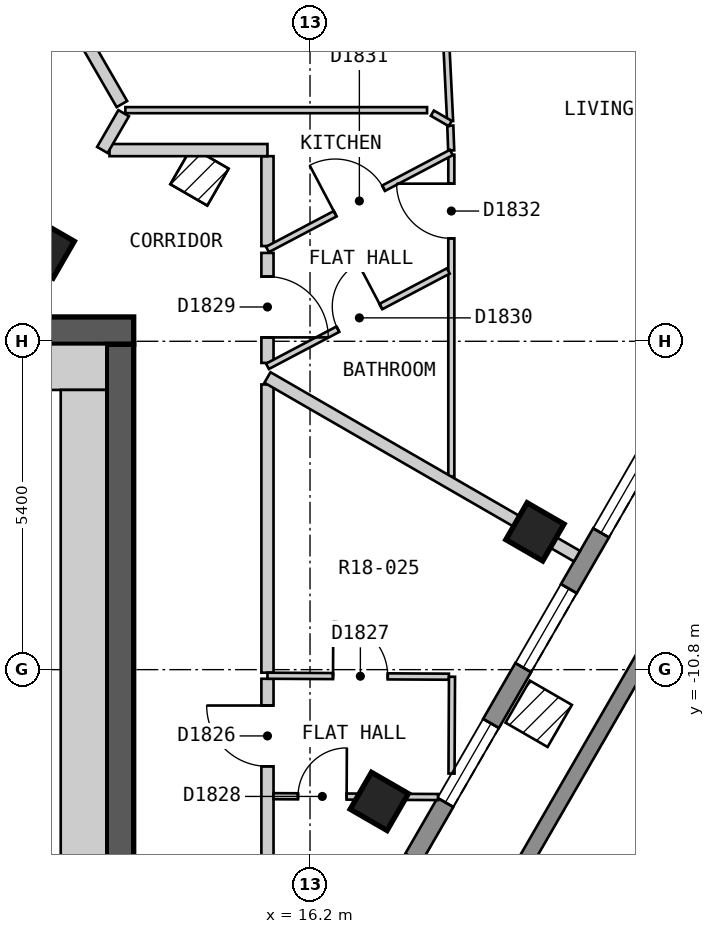
"""IFC4 building model, lengths in metres.
Left out: names, types, materials, properties, quantities, classifications, styles, units other than length and angle.
Written with IfcOpenShell. Run it as: python <this file> out.ifc"""

import sys

from ifc_helpers import new_model, si_unit, direction, frame, frame_2d, origin, origin_2d, place, context, subcontext, project, spatial, polyline, rectangle, outline, extrude, element, fill, save


model = new_model("IFC4")
c1 = context("Model", 3, precision=1e-05, world=origin(), true_north=direction((0.0, 1.0)))
c2 = subcontext(c1, "Body", "Model", "MODEL_VIEW")
j1 = project(units=[si_unit("LENGTHUNIT", "METRE"), si_unit("PLANEANGLEUNIT", "RADIAN")], contexts=[c1])
p1 = place(None, origin())
s1 = spatial("IfcSite", under=j1, at=p1, CompositionType="ELEMENT")
p2 = place(p1, origin())
s2 = spatial("IfcBuilding", under=s1, at=p2, CompositionType="ELEMENT")
p3 = place(p2, frame((0.0, 0.0, 202.8)))
s3 = spatial("IfcBuildingStorey", under=s2, at=p3, CompositionType="ELEMENT", Elevation=202.8)
for number, where, z_axis, x_axis in (
    (1, (17.339, -12.967, 0.0), (0.0, 0.0, 1.0), (0.5, 0.866, 0.0)),
    (2, (19.899, -8.534, 0.0), (0.0, 0.0, 1.0), (0.5, 0.866, 0.0)),
    (3, (11.845, -3.884, 0.0), (0.0, 0.0, 1.0), (0.5, 0.866, 0.0)),
):
    element("IfcColumn", number, at=place(p3, frame(where, z_axis=z_axis, x_axis=x_axis)), inside=s3, PredefinedType="COLUMN", context=c2, shape_type="SweptSolid", body=[
        extrude(rectangle(XDim=0.7, YDim=0.7, at=origin_2d()), origin(), (0.0, 0.0, 1.0), 3.0),
    ])
p4 = place(p3, frame((-13.3, -5.225, 0.0), z_axis=(0.0, 0.0, 1.0), x_axis=(1.0, 0.0, 0.0)))
e4 = element("IfcWall", 4, at=p4, inside=s3, PredefinedType="SHEAR", context=c2, shape_type="SweptSolid", body=[
    extrude(rectangle(XDim=26.6, YDim=0.45, at=frame_2d((13.3, 0.0))), origin(), (0.0, 0.0, 1.0), 2.7),
])
p5 = place(p4, frame((23.65, 0.0, 0.0)))
e5 = element("IfcOpeningElement", 5, at=p5, cuts=e4, PredefinedType="OPENING", context=c2, shape_type="SweptSolid", body=[
    extrude(rectangle(XDim=1.2, YDim=2.1, at=frame_2d((0.6, 1.05))), frame((0.0, 0.235, 0.0), z_axis=(0.0, -1.0, 0.0), x_axis=(1.0, 0.0, 0.0)), (0.0, 0.0, 1.0), 0.47),
])
p6 = place(p3, frame((13.075, -18.55, 0.0), z_axis=(0.0, 0.0, 1.0), x_axis=(0.0, 1.0, 0.0)))
e6 = element("IfcWall", 6, at=p6, inside=s3, PredefinedType="SHEAR", context=c2, shape_type="SweptSolid", body=[
    extrude(rectangle(XDim=13.1, YDim=0.45, at=frame_2d((6.55, 0.0))), origin(), (0.0, 0.0, 1.0), 2.7),
])
p7 = place(p3, frame((15.285, -18.425, 0.0), z_axis=(0.0, 0.0, 1.0), x_axis=(0.500012653391, 0.866018098222, 0.0)))
e7 = element("IfcWall", 7, at=p7, inside=s3, PredefinedType="SOLIDWALL", context=c2, shape_type="SweptSolid", body=[
    extrude(outline(polyline([(0.0, -0.15), (16.628, -0.15), (16.548, 0.15), (0.08, 0.15), (0.0, -0.15)])), origin(), (0.0, 0.0, 1.0), 2.7),
])
p8 = place(p7, frame((1.165, 0.0, 0.15)))
e8 = element("IfcOpeningElement", 8, at=p8, cuts=e7, PredefinedType="OPENING", context=c2, shape_type="SweptSolid", body=[
    extrude(rectangle(XDim=1.5, YDim=2.1, at=frame_2d((0.75, 1.05))), frame((0.0, 0.16, 0.0), z_axis=(0.0, -1.0, 0.0), x_axis=(1.0, 0.0, 0.0)), (0.0, 0.0, 1.0), 0.32),
])
p9 = place(p7, frame((3.724, 0.0, 0.15)))
e9 = element("IfcOpeningElement", 9, at=p9, cuts=e7, PredefinedType="OPENING", context=c2, shape_type="SweptSolid", body=[
    extrude(rectangle(XDim=1.5, YDim=2.1, at=frame_2d((0.75, 1.05))), frame((0.0, 0.16, 0.0), z_axis=(0.0, -1.0, 0.0), x_axis=(1.0, 0.0, 0.0)), (0.0, 0.0, 1.0), 0.32),
])
p10 = place(p7, frame((6.283, 0.0, 0.15)))
e10 = element("IfcOpeningElement", 10, at=p10, cuts=e7, PredefinedType="OPENING", context=c2, shape_type="SweptSolid", body=[
    extrude(rectangle(XDim=1.5, YDim=2.1, at=frame_2d((0.75, 1.05))), frame((0.0, 0.16, 0.0), z_axis=(0.0, -1.0, 0.0), x_axis=(1.0, 0.0, 0.0)), (0.0, 0.0, 1.0), 0.32),
])
p11 = place(p7, frame((8.843, 0.0, 0.15)))
e11 = element("IfcOpeningElement", 11, at=p11, cuts=e7, PredefinedType="OPENING", context=c2, shape_type="SweptSolid", body=[
    extrude(rectangle(XDim=1.5, YDim=2.1, at=frame_2d((0.75, 1.05))), frame((0.0, 0.16, 0.0), z_axis=(0.0, -1.0, 0.0), x_axis=(1.0, 0.0, 0.0)), (0.0, 0.0, 1.0), 0.32),
])
p12 = place(p7, frame((11.402, 0.0, 0.15)))
e12 = element("IfcOpeningElement", 12, at=p12, cuts=e7, PredefinedType="OPENING", context=c2, shape_type="SweptSolid", body=[
    extrude(rectangle(XDim=1.5, YDim=2.1, at=frame_2d((0.75, 1.05))), frame((0.0, 0.16, 0.0), z_axis=(0.0, -1.0, 0.0), x_axis=(1.0, 0.0, 0.0)), (0.0, 0.0, 1.0), 0.32),
])
p13 = place(p7, frame((13.962, 0.0, 0.15)))
e13 = element("IfcOpeningElement", 13, at=p13, cuts=e7, PredefinedType="OPENING", context=c2, shape_type="SweptSolid", body=[
    extrude(rectangle(XDim=1.5, YDim=2.1, at=frame_2d((0.75, 1.05))), frame((0.0, 0.16, 0.0), z_axis=(0.0, -1.0, 0.0), x_axis=(1.0, 0.0, 0.0)), (0.0, 0.0, 1.0), 0.32),
])
p14 = place(p3, frame((26.046, -3.038, 0.0), z_axis=(0.0, 0.0, 1.0), x_axis=(-0.500074253024, -0.865982529536, 0.0)))
e14 = element("IfcWall", 14, at=p14, inside=s3, PredefinedType="PARAPET", context=c2, shape_type="SweptSolid", body=[
    extrude(outline(polyline([(0.067, -0.125), (20.718, -0.125), (20.784, 0.125), (0.0, 0.125), (0.067, -0.125)])), origin(), (0.0, 0.0, 1.0), 1.6),
])
p15 = place(p3, frame((9.238, 5.2, 0.0), z_axis=(0.0, 0.0, 1.0), x_axis=(0.500025705601, -0.86601056214, 0.0)))
e15 = element("IfcWall", 15, at=p15, inside=s3, PredefinedType="PARTITIONING", context=c2, shape_type="SweptSolid", body=[
    extrude(rectangle(XDim=7.735, YDim=0.2, at=frame_2d((3.868, 0.0))), origin(), (0.0, 0.0, 1.0), 2.7),
])
p16 = place(p3, frame((15.5, -2.356, 0.0), z_axis=(0.0, 0.0, 1.0), x_axis=(0.0, -1.0, 0.0)))
e16 = element("IfcWall", 16, at=p16, inside=s3, PredefinedType="PARTITIONING", context=c2, shape_type="SweptSolid", body=[
    extrude(rectangle(XDim=1.478, YDim=0.2, at=frame_2d((0.739, 0.0))), origin(), (0.0, 0.0, 1.0), 2.7),
])
p17 = place(p3, frame((15.5, -6.11, 0.0), z_axis=(0.0, 0.0, 1.0), x_axis=(0.0, -1.0, 0.0)))
e17 = element("IfcWall", 17, at=p17, inside=s3, PredefinedType="PARTITIONING", context=c2, shape_type="SweptSolid", body=[
    extrude(rectangle(XDim=4.74, YDim=0.2, at=frame_2d((2.37, 0.0))), origin(), (0.0, 0.0, 1.0), 2.7),
])
p18 = place(p3, frame((12.902, -2.256, 0.0), z_axis=(0.0, 0.0, 1.0), x_axis=(1.0, 0.0, 0.0)))
e18 = element("IfcWall", 18, at=p18, inside=s3, PredefinedType="PARTITIONING", context=c2, shape_type="SweptSolid", body=[
    extrude(rectangle(XDim=2.598, YDim=0.2, at=frame_2d((1.299, 0.0))), origin(), (0.0, 0.0, 1.0), 2.7),
])
p19 = place(p3, frame((12.785, -2.254, 0.0), z_axis=(0.0, 0.0, 1.0), x_axis=(0.500871040665, 0.865521923826, 0.0)))
e19 = element("IfcWall", 19, at=p19, inside=s3, PredefinedType="PARTITIONING", context=c2, shape_type="SweptSolid", body=[
    extrude(rectangle(XDim=0.699, YDim=0.2, at=frame_2d((0.35, 0.0))), origin(), (0.0, 0.0, 1.0), 2.7),
])
p20 = place(p3, frame((15.5, -15.09, 0.0), z_axis=(0.0, 0.0, 1.0), x_axis=(0.0, 1.0, 0.0)))
e20 = element("IfcWall", 20, at=p20, inside=s3, PredefinedType="PARTITIONING", context=c2, shape_type="SweptSolid", body=[
    extrude(rectangle(XDim=4.14, YDim=0.2, at=frame_2d((2.07, 0.0))), origin(), (0.0, 0.0, 1.0), 2.7),
])
p21 = place(p20, frame((2.7, 0.0, 0.0)))
e21 = element("IfcOpeningElement", 21, at=p21, cuts=e20, PredefinedType="OPENING", context=c2, shape_type="SweptSolid", body=[
    extrude(rectangle(XDim=1.0, YDim=2.1, at=frame_2d((0.5, 1.05))), frame((0.0, 0.11, 0.0), z_axis=(0.0, -1.0, 0.0), x_axis=(1.0, 0.0, 0.0)), (0.0, 0.0, 1.0), 0.22),
])
p22 = place(p3, frame((15.5, -5.756, 0.0), z_axis=(0.0, 0.0, 1.0), x_axis=(0.0, 1.0, 0.0)))
e22 = element("IfcWall", 22, at=p22, inside=s3, PredefinedType="PARTITIONING", context=c2, shape_type="SweptSolid", body=[
    extrude(rectangle(XDim=1.809, YDim=0.2, at=frame_2d((0.905, 0.0))), origin(), (0.0, 0.0, 1.0), 2.7),
])
p23 = place(p22, frame((0.42, 0.0, 0.0)))
e23 = element("IfcOpeningElement", 23, at=p23, cuts=e22, PredefinedType="OPENING", context=c2, shape_type="SweptSolid", body=[
    extrude(rectangle(XDim=1.0, YDim=2.1, at=frame_2d((0.5, 1.05))), frame((0.0, 0.11, 0.0), z_axis=(0.0, -1.0, 0.0), x_axis=(1.0, 0.0, 0.0)), (0.0, 0.0, 1.0), 0.22),
])
p24 = place(p3, frame((15.5, -10.9, 0.0), z_axis=(0.0, 0.0, 1.0), x_axis=(0.999985419789, -0.005400019449, 0.0)))
e24 = element("IfcWall", 24, at=p24, inside=s3, PredefinedType="PARTITIONING", context=c2, shape_type="SweptSolid", body=[
    extrude(rectangle(XDim=2.984, YDim=0.1, at=frame_2d((1.492, 0.0))), origin(), (0.0, 0.0, 1.0), 2.7),
])
p25 = place(p24, frame((1.078, 0.0, 0.0)))
e25 = element("IfcOpeningElement", 25, at=p25, cuts=e24, PredefinedType="OPENING", context=c2, shape_type="SweptSolid", body=[
    extrude(rectangle(XDim=0.9, YDim=2.1, at=frame_2d((0.45, 1.05))), frame((0.0, 0.06, 0.0), z_axis=(0.0, -1.0, 0.0), x_axis=(1.0, 0.0, 0.0)), (0.0, 0.0, 1.0), 0.12),
])
p26 = place(p3, frame((15.6, -12.881, 0.0), z_axis=(0.0, 0.0, 1.0), x_axis=(0.999986765426, -0.00514480058, 0.0)))
e26 = element("IfcWall", 26, at=p26, inside=s3, PredefinedType="PARTITIONING", context=c2, shape_type="SweptSolid", body=[
    extrude(rectangle(XDim=2.705, YDim=0.1, at=frame_2d((1.353, 0.0))), origin(), (0.0, 0.0, 1.0), 2.7),
])
p27 = place(p26, frame((0.402, 0.0, 0.0)))
e27 = element("IfcOpeningElement", 27, at=p27, cuts=e26, PredefinedType="OPENING", context=c2, shape_type="SweptSolid", body=[
    extrude(rectangle(XDim=0.8, YDim=2.1, at=frame_2d((0.4, 1.05))), frame((0.0, 0.06, 0.0), z_axis=(0.0, -1.0, 0.0), x_axis=(1.0, 0.0, 0.0)), (0.0, 0.0, 1.0), 0.12),
])
p28 = place(p3, frame((18.388, 0.579, 0.0), z_axis=(0.0, 0.0, 1.0), x_axis=(0.049097293833, -0.998794000652, 0.0)))
e28 = element("IfcWall", 28, at=p28, inside=s3, PredefinedType="PARTITIONING", context=c2, shape_type="SweptSolid", body=[
    extrude(rectangle(XDim=2.362, YDim=0.1, at=frame_2d((1.181, 0.0))), origin(), (0.0, 0.0, 1.0), 2.7),
])
p29 = place(p3, frame((18.507, -1.854, 0.0), z_axis=(0.0, 0.0, 1.0), x_axis=(0.036480787329, -0.999334354536, 0.0)))
e29 = element("IfcWall", 29, at=p29, inside=s3, PredefinedType="PARTITIONING", context=c2, shape_type="SweptSolid", body=[
    extrude(rectangle(XDim=0.408, YDim=0.1, at=frame_2d((0.204, 0.0))), origin(), (0.0, 0.0, 1.0), 2.7),
])
p30 = place(p3, frame((18.212, -1.649, 0.0), z_axis=(0.0, 0.0, 1.0), x_axis=(0.865622947871, -0.500696427109, 0.0)))
e30 = element("IfcWall", 30, at=p30, inside=s3, PredefinedType="PARTITIONING", context=c2, shape_type="SweptSolid", body=[
    extrude(rectangle(XDim=0.34, YDim=0.1, at=frame_2d((0.17, 0.0))), origin(), (0.0, 0.0, 1.0), 2.7),
])
p31 = place(p3, frame((13.163, -1.599, 0.0), z_axis=(0.0, 0.0, 1.0), x_axis=(1.0, 0.0, 0.0)))
e31 = element("IfcWall", 31, at=p31, inside=s3, PredefinedType="PARTITIONING", context=c2, shape_type="SweptSolid", body=[
    extrude(rectangle(XDim=4.962, YDim=0.1, at=frame_2d((2.481, 0.0))), origin(), (0.0, 0.0, 1.0), 2.7),
])
p32 = place(p3, frame((18.527, -12.509, 0.0), z_axis=(0.0, 0.0, 1.0), x_axis=(0.004907163735, 0.9999879598, 0.0)))
e32 = element("IfcWall", 32, at=p32, inside=s3, PredefinedType="PARTITIONING", context=c2, shape_type="SweptSolid", body=[
    extrude(rectangle(XDim=1.592, YDim=0.1, at=frame_2d((0.796, 0.0))), origin(), (0.0, 0.0, 1.0), 2.7),
])
p33 = place(p3, frame((18.524, -7.625, 0.0), z_axis=(0.0, 0.0, 1.0), x_axis=(0.0, 1.0, 0.0)))
e33 = element("IfcWall", 33, at=p33, inside=s3, PredefinedType="PARTITIONING", context=c2, shape_type="SweptSolid", body=[
    extrude(rectangle(XDim=5.293, YDim=0.1, at=frame_2d((2.646, 0.0))), origin(), (0.0, 0.0, 1.0), 2.7),
])
p34 = place(p33, frame((3.917, 0.0, 0.0)))
e34 = element("IfcOpeningElement", 34, at=p34, cuts=e33, PredefinedType="OPENING", context=c2, shape_type="SweptSolid", body=[
    extrude(rectangle(XDim=0.9, YDim=2.1, at=frame_2d((0.45, 1.05))), frame((0.0, 0.06, 0.0), z_axis=(0.0, -1.0, 0.0), x_axis=(1.0, 0.0, 0.0)), (0.0, 0.0, 1.0), 0.12),
])
p35 = place(p3, frame((15.5, -3.89, 0.0), z_axis=(0.0, 0.0, 1.0), x_axis=(0.884504274727, 0.466532086775, 0.0)))
e35 = element("IfcWall", 35, at=p35, inside=s3, PredefinedType="PARTITIONING", context=c2, shape_type="SweptSolid", body=[
    extrude(rectangle(XDim=3.419, YDim=0.1, at=frame_2d((1.709, 0.0))), origin(), (0.0, 0.0, 1.0), 2.7),
])
p36 = place(p35, frame((1.259, 0.0, 0.0)))
e36 = element("IfcOpeningElement", 36, at=p36, cuts=e35, PredefinedType="OPENING", context=c2, shape_type="SweptSolid", body=[
    extrude(rectangle(XDim=0.9, YDim=2.1, at=frame_2d((0.45, 1.05))), frame((0.0, 0.06, 0.0), z_axis=(0.0, -1.0, 0.0), x_axis=(1.0, 0.0, 0.0)), (0.0, 0.0, 1.0), 0.12),
])
p37 = place(p3, frame((15.5, -5.812, 0.0), z_axis=(0.0, 0.0, 1.0), x_axis=(0.884576181409, 0.46639573249, 0.0)))
e37 = element("IfcWall", 37, at=p37, inside=s3, PredefinedType="PARTITIONING", context=c2, shape_type="SweptSolid", body=[
    extrude(rectangle(XDim=3.362, YDim=0.1, at=frame_2d((1.681, 0.0))), origin(), (0.0, 0.0, 1.0), 2.7),
])
p38 = place(p37, frame((1.309, 0.0, 0.0)))
e38 = element("IfcOpeningElement", 38, at=p38, cuts=e37, PredefinedType="OPENING", context=c2, shape_type="SweptSolid", body=[
    extrude(rectangle(XDim=0.8, YDim=2.1, at=frame_2d((0.4, 1.05))), frame((0.0, 0.06, 0.0), z_axis=(0.0, -1.0, 0.0), x_axis=(1.0, 0.0, 0.0)), (0.0, 0.0, 1.0), 0.12),
])
p39 = place(p3, frame((15.5, -5.995, 0.0), z_axis=(0.0, 0.0, 1.0), x_axis=(0.866052111102, -0.499953738716, 0.0)))
e39 = element("IfcWall", 39, at=p39, inside=s3, PredefinedType="PARTITIONING", context=c2, shape_type="SweptSolid", body=[
    extrude(rectangle(XDim=5.878, YDim=0.2, at=frame_2d((2.939, 0.0))), origin(), (0.0, 0.0, 1.0), 2.7),
])
p40 = place(p3, frame((11.55, -5.825, 0.0), z_axis=(0.0, 0.0, 1.0), x_axis=(1.0, 0.0, 0.0)))
e40 = element("IfcWall", 40, at=p40, inside=s3, PredefinedType="PARTITIONING", context=c2, shape_type="SweptSolid", body=[
    extrude(rectangle(XDim=1.3, YDim=0.75, at=frame_2d((0.65, 0.0))), origin(), (0.0, 0.0, 1.0), 2.7),
])
p41 = place(p3, frame((12.475, -14.45, 0.0), z_axis=(0.0, 0.0, 1.0), x_axis=(0.0, 1.0, 0.0)))
e41 = element("IfcWall", 41, at=p41, inside=s3, PredefinedType="PARTITIONING", context=c2, shape_type="SweptSolid", body=[
    extrude(rectangle(XDim=8.25, YDim=0.75, at=frame_2d((4.125, 0.0))), origin(), (0.0, 0.0, 1.0), 2.7),
])
p42 = place(p10, origin())
e42 = element("IfcWindow", 42, at=p42, inside=s3, PartitioningType="SINGLE_PANEL", PredefinedType="WINDOW", context=c2, shape_type="SweptSolid", body=[
    extrude(rectangle(XDim=1.5, YDim=2.1, at=frame_2d((0.75, 1.05))), frame((0.0, 0.03, 0.0), z_axis=(0.0, -1.0, 0.0), x_axis=(1.0, 0.0, 0.0)), (0.0, 0.0, 1.0), 0.06),
])
fill(e10, e42)
p43 = place(p11, origin())
e43 = element("IfcWindow", 43, at=p43, inside=s3, PartitioningType="SINGLE_PANEL", PredefinedType="WINDOW", context=c2, shape_type="SweptSolid", body=[
    extrude(rectangle(XDim=1.5, YDim=2.1, at=frame_2d((0.75, 1.05))), frame((0.0, 0.03, 0.0), z_axis=(0.0, -1.0, 0.0), x_axis=(1.0, 0.0, 0.0)), (0.0, 0.0, 1.0), 0.06),
])
fill(e11, e43)
p44 = place(p12, origin())
e44 = element("IfcWindow", 44, at=p44, inside=s3, PartitioningType="SINGLE_PANEL", PredefinedType="WINDOW", context=c2, shape_type="SweptSolid", body=[
    extrude(rectangle(XDim=1.5, YDim=2.1, at=frame_2d((0.75, 1.05))), frame((0.0, 0.03, 0.0), z_axis=(0.0, -1.0, 0.0), x_axis=(1.0, 0.0, 0.0)), (0.0, 0.0, 1.0), 0.06),
])
fill(e12, e44)
p45 = place(p21, origin())
e45 = element("IfcDoor", 45, at=p45, inside=s3, OperationType="SINGLE_SWING_RIGHT", PredefinedType="DOOR", context=c2, shape_type="SweptSolid", body=[
    extrude(rectangle(XDim=1.0, YDim=2.1, at=frame_2d((0.5, 1.05))), frame((0.0, 0.025, 0.0), z_axis=(0.0, -1.0, 0.0), x_axis=(1.0, 0.0, 0.0)), (0.0, 0.0, 1.0), 0.05),
])
fill(e21, e45)
p46 = place(p25, origin())
e46 = element("IfcDoor", 46, at=p46, inside=s3, OperationType="SINGLE_SWING_LEFT", PredefinedType="DOOR", context=c2, shape_type="SweptSolid", body=[
    extrude(rectangle(XDim=0.9, YDim=2.1, at=frame_2d((0.45, 1.05))), frame((0.0, 0.025, 0.0), z_axis=(0.0, -1.0, 0.0), x_axis=(1.0, 0.0, 0.0)), (0.0, 0.0, 1.0), 0.05),
])
fill(e25, e46)
p47 = place(p27, origin())
e47 = element("IfcDoor", 47, at=p47, inside=s3, OperationType="SINGLE_SWING_RIGHT", PredefinedType="DOOR", context=c2, shape_type="SweptSolid", body=[
    extrude(rectangle(XDim=0.8, YDim=2.1, at=frame_2d((0.4, 1.05))), frame((0.0, 0.025, 0.0), z_axis=(0.0, -1.0, 0.0), x_axis=(1.0, 0.0, 0.0)), (0.0, 0.0, 1.0), 0.05),
])
fill(e27, e47)
p48 = place(p23, origin())
e48 = element("IfcDoor", 48, at=p48, inside=s3, OperationType="SINGLE_SWING_LEFT", PredefinedType="DOOR", context=c2, shape_type="SweptSolid", body=[
    extrude(rectangle(XDim=1.0, YDim=2.1, at=frame_2d((0.5, 1.05))), frame((0.0, 0.025, 0.0), z_axis=(0.0, -1.0, 0.0), x_axis=(1.0, 0.0, 0.0)), (0.0, 0.0, 1.0), 0.05),
])
fill(e23, e48)
p49 = place(p38, origin())
e49 = element("IfcDoor", 49, at=p49, inside=s3, OperationType="SINGLE_SWING_RIGHT", PredefinedType="DOOR", context=c2, shape_type="SweptSolid", body=[
    extrude(rectangle(XDim=0.8, YDim=2.1, at=frame_2d((0.4, 1.05))), frame((0.0, 0.025, 0.0), z_axis=(0.0, -1.0, 0.0), x_axis=(1.0, 0.0, 0.0)), (0.0, 0.0, 1.0), 0.05),
])
fill(e38, e49)
p50 = place(p36, origin())
e50 = element("IfcDoor", 50, at=p50, inside=s3, OperationType="SINGLE_SWING_LEFT", PredefinedType="DOOR", context=c2, shape_type="SweptSolid", body=[
    extrude(rectangle(XDim=0.9, YDim=2.1, at=frame_2d((0.45, 1.05))), frame((0.0, 0.025, 0.0), z_axis=(0.0, -1.0, 0.0), x_axis=(1.0, 0.0, 0.0)), (0.0, 0.0, 1.0), 0.05),
])
fill(e36, e50)
p51 = place(p34, origin())
e51 = element("IfcDoor", 51, at=p51, inside=s3, OperationType="SINGLE_SWING_RIGHT", PredefinedType="DOOR", context=c2, shape_type="SweptSolid", body=[
    extrude(rectangle(XDim=0.9, YDim=2.1, at=frame_2d((0.45, 1.05))), frame((0.0, 0.025, 0.0), z_axis=(0.0, -1.0, 0.0), x_axis=(1.0, 0.0, 0.0)), (0.0, 0.0, 1.0), 0.05),
])
fill(e34, e51)
save(model, sys.argv[1])
